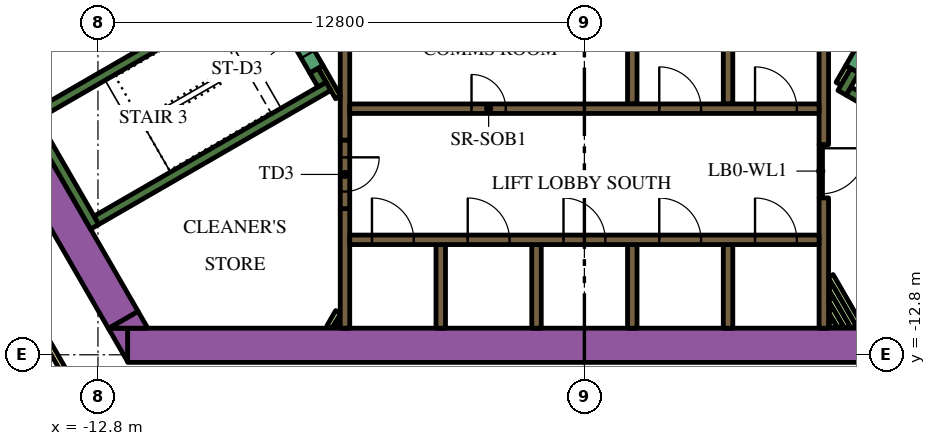
"""IFC4 building model, lengths in metres.
Left out: names, types, materials, properties, quantities, classifications, styles, units other than length and angle.
Written with IfcOpenShell. Run it as: python <this file> out.ifc"""

import sys

from ifc_helpers import new_model, si_unit, direction, frame, frame_2d, origin, place, context, subcontext, project, spatial, polyline, rectangle, outline, extrude, element, fill, save


model = new_model("IFC4")
c1 = context("Model", 3, precision=1e-05, world=origin(), true_north=direction((0.0, 1.0)))
c2 = subcontext(c1, "Body", "Model", "MODEL_VIEW")
j1 = project(units=[si_unit("LENGTHUNIT", "METRE"), si_unit("PLANEANGLEUNIT", "RADIAN")], contexts=[c1])
p1 = place(None, origin())
s1 = spatial("IfcSite", under=j1, at=p1, CompositionType="ELEMENT")
p2 = place(p1, origin())
s2 = spatial("IfcBuilding", under=s1, at=p2, CompositionType="ELEMENT")
p3 = place(p2, frame((0.0, 0.0, 51.0)))
s3 = spatial("IfcBuildingStorey", under=s2, at=p3, CompositionType="ELEMENT", Elevation=51.0)
p4 = place(p3, frame((-12.019, -12.55, 0.0), z_axis=(0.0, 0.0, 1.0), x_axis=(1.0, 0.0, 0.0)))
e1 = element("IfcWall", 1, at=p4, inside=s3, PredefinedType="SOLIDWALL", context=c2, shape_type="SweptSolid", body=[
    extrude(rectangle(XDim=22.083, YDim=0.9, at=frame_2d((11.042, 0.0))), origin(), (0.0, 0.0, 1.0), 3.9),
])
p5 = place(p3, origin())
e2 = element("IfcWall", 2, at=p5, inside=s3, PredefinedType="SOLIDWALL", context=c2, shape_type="SweptSolid", body=[
    extrude(outline(polyline([(-12.529, -12.1), (-12.021, -12.1), (-12.021, -12.98), (-12.529, -12.1)])), origin(), (0.0, 0.0, 1.0), 3.9),
])
p6 = place(p3, frame((-12.134, -11.883, 0.0), z_axis=(0.0, 0.0, 1.0), x_axis=(-0.500005339912, 0.866022320763, 0.0)))
e3 = element("IfcWall", 3, at=p6, inside=s3, PredefinedType="SOLIDWALL", context=c2, shape_type="SweptSolid", body=[
    extrude(rectangle(XDim=9.488, YDim=0.9, at=frame_2d((4.744, 0.0))), origin(), (0.0, 0.0, 1.0), 3.9),
])
e4 = element("IfcWall", 4, at=p5, inside=s3, PredefinedType="SOLIDWALL", context=c2, shape_type="SweptSolid", body=[
    extrude(outline(polyline([(-11.489, -12.1), (-12.505, -12.1), (-11.743, -11.66), (-11.489, -12.1)])), origin(), (0.0, 0.0, 1.0), 3.9),
])
p7 = place(p3, frame((12.84, -9.261, 0.0), z_axis=(0.0, 0.0, 1.0), x_axis=(-0.866013990052, 0.500019768644, 0.0)))
e5 = element("IfcWall", 5, at=p7, inside=s3, PredefinedType="SOLIDWALL", context=c2, shape_type="SweptSolid", body=[
    extrude(rectangle(XDim=6.8, YDim=0.25, at=frame_2d((3.4, 0.0))), origin(), (0.0, 0.0, 1.0), 3.9),
])
p8 = place(p3, frame((6.78, -5.906, 0.0), z_axis=(0.0, 0.0, 1.0), x_axis=(0.500223362819, 0.865896406789, 0.0)))
e6 = element("IfcWall", 6, at=p8, inside=s3, PredefinedType="SOLIDWALL", context=c2, shape_type="SweptSolid", body=[
    extrude(rectangle(XDim=0.675, YDim=0.25, at=frame_2d((0.337, 0.0))), origin(), (0.0, 0.0, 1.0), 3.9),
])
p9 = place(p3, frame((-12.885, -9.431, 0.0), z_axis=(0.0, 0.0, 1.0), x_axis=(-0.500020560727, 0.866013532718, 0.0)))
e7 = element("IfcWall", 7, at=p9, inside=s3, PredefinedType="SOLIDWALL", context=c2, shape_type="SweptSolid", body=[
    extrude(rectangle(XDim=3.45, YDim=0.25, at=frame_2d((1.725, 0.0))), origin(), (0.0, 0.0, 1.0), 3.9),
])
p10 = place(p3, frame((-14.44, -6.49, 0.0), z_axis=(0.0, 0.0, 1.0), x_axis=(0.866022966069, 0.500004222222, 0.0)))
e8 = element("IfcWall", 8, at=p10, inside=s3, PredefinedType="SOLIDWALL", context=c2, shape_type="SweptSolid", body=[
    extrude(rectangle(XDim=6.8, YDim=0.25, at=frame_2d((3.4, 0.0))), origin(), (0.0, 0.0, 1.0), 3.9),
])
p11 = place(p3, frame((-12.84, -9.261, 0.0), z_axis=(0.0, 0.0, 1.0), x_axis=(0.866016039709, 0.500016218704, 0.0)))
e9 = element("IfcWall", 9, at=p11, inside=s3, PredefinedType="SOLIDWALL", context=c2, shape_type="SweptSolid", body=[
    extrude(rectangle(XDim=7.05, YDim=0.25, at=frame_2d((3.525, 0.0))), origin(), (0.0, 0.0, 1.0), 3.9),
])
p12 = place(p3, frame((-6.905, -5.69, 0.0), z_axis=(0.0, 0.0, 1.0), x_axis=(-0.500402024738, 0.865793170242, 0.0)))
e10 = element("IfcWall", 10, at=p12, inside=s3, PredefinedType="SOLIDWALL", context=c2, shape_type="SweptSolid", body=[
    extrude(rectangle(XDim=0.425, YDim=0.25, at=frame_2d((0.212, 0.0))), origin(), (0.0, 0.0, 1.0), 3.9),
])
p13 = place(p3, frame((-3.78, -12.1, 0.0), z_axis=(0.0, 0.0, 1.0), x_axis=(0.0, 1.0, 0.0)))
e11 = element("IfcWall", 11, at=p13, inside=s3, PredefinedType="SOLIDWALL", context=c2, shape_type="SweptSolid", body=[
    extrude(rectangle(XDim=2.2, YDim=0.25, at=frame_2d((1.1, 0.0))), origin(), (0.0, 0.0, 1.0), 3.9),
])
p14 = place(p3, frame((-6.3, -12.1, 0.0), z_axis=(0.0, 0.0, 1.0), x_axis=(0.0, 1.0, 0.0)))
e12 = element("IfcWall", 12, at=p14, inside=s3, PredefinedType="SOLIDWALL", context=c2, shape_type="SweptSolid", body=[
    extrude(rectangle(XDim=3.146, YDim=0.25, at=frame_2d((1.573, 0.0))), origin(), (0.0, 0.0, 1.0), 3.9),
])
for number, where, z_axis, x_axis in (
    (13, (3.78, -4.0, 0.0), (0.0, 0.0, 1.0), (0.0, -1.0, 0.0)),
    (14, (1.26, -4.0, 0.0), (0.0, 0.0, 1.0), (0.0, -1.0, 0.0)),
):
    element("IfcWall", number, at=place(p3, frame(where, z_axis=z_axis, x_axis=x_axis)), inside=s3, PredefinedType="SOLIDWALL", context=c2, shape_type="SweptSolid", body=[
        extrude(rectangle(XDim=2.2, YDim=0.25, at=frame_2d((1.1, 0.0))), origin(), (0.0, 0.0, 1.0), 3.9),
    ])
p15 = place(p3, frame((-6.3, -3.75, 0.0), z_axis=(0.0, 0.0, 1.0), x_axis=(0.0, -1.0, 0.0)))
e15 = element("IfcWall", 15, at=p15, inside=s3, PredefinedType="SOLIDWALL", context=c2, shape_type="SweptSolid", body=[
    extrude(rectangle(XDim=3.404, YDim=0.25, at=frame_2d((1.702, 0.0))), origin(), (0.0, 0.0, 1.0), 3.9),
])
p16 = place(p3, frame((6.3, -7.27, 0.0), z_axis=(0.0, 0.0, 1.0), x_axis=(0.0, 1.0, 0.0)))
e16 = element("IfcWall", 16, at=p16, inside=s3, PredefinedType="SOLIDWALL", context=c2, shape_type="SweptSolid", body=[
    extrude(rectangle(XDim=3.586, YDim=0.25, at=frame_2d((1.793, 0.0))), origin(), (0.0, 0.0, 1.0), 3.9),
])
p17 = place(p3, frame((6.3, -12.1, 0.0), z_axis=(0.0, 0.0, 1.0), x_axis=(0.0, 1.0, 0.0)))
e17 = element("IfcWall", 17, at=p17, inside=s3, PredefinedType="SOLIDWALL", context=c2, shape_type="SweptSolid", body=[
    extrude(rectangle(XDim=3.428, YDim=0.25, at=frame_2d((1.714, 0.0))), origin(), (0.0, 0.0, 1.0), 3.9),
])
for number, where, z_axis, x_axis in (
    (18, (3.78, -12.1, 0.0), (0.0, 0.0, 1.0), (0.0, 1.0, 0.0)),
    (19, (1.26, -12.1, 0.0), (0.0, 0.0, 1.0), (0.0, 1.0, 0.0)),
    (20, (-1.26, -12.1, 0.0), (0.0, 0.0, 1.0), (0.0, 1.0, 0.0)),
):
    element("IfcWall", number, at=place(p3, frame(where, z_axis=z_axis, x_axis=x_axis)), inside=s3, PredefinedType="SOLIDWALL", context=c2, shape_type="SweptSolid", body=[
        extrude(rectangle(XDim=2.2, YDim=0.25, at=frame_2d((1.1, 0.0))), origin(), (0.0, 0.0, 1.0), 3.9),
    ])
p18 = place(p3, frame((-6.708, -12.068, 0.0), z_axis=(0.0, 0.0, 1.0), x_axis=(0.500000789788, 0.8660249478, 0.0)))
e21 = element("IfcWall", 21, at=p18, inside=s3, PredefinedType="PARTITIONING", context=c2, shape_type="SweptSolid", body=[
    extrude(rectangle(XDim=0.456, YDim=0.15, at=frame_2d((0.228, 0.0))), origin(), (0.0, 0.0, 1.0), 2.75),
])
p19 = place(p3, frame((-6.534, -12.068, 0.0), z_axis=(0.0, 0.0, 1.0), x_axis=(0.500240224089, 0.865886665912, 0.0)))
e22 = element("IfcWall", 22, at=p19, inside=s3, PredefinedType="PARTITIONING", context=c2, shape_type="SweptSolid", body=[
    extrude(rectangle(XDim=0.109, YDim=0.15, at=frame_2d((0.054, 0.0))), origin(), (0.0, 0.0, 1.0), 2.75),
])
p20 = place(p3, frame((-6.48, -6.027, 0.0), z_axis=(0.0, 0.0, 1.0), x_axis=(-0.499927229454, 0.866067413802, 0.0)))
e23 = element("IfcWall", 23, at=p20, inside=s3, PredefinedType="PARTITIONING", context=c2, shape_type="SweptSolid", body=[
    extrude(rectangle(XDim=0.929, YDim=0.15, at=frame_2d((0.464, 0.0))), origin(), (0.0, 0.0, 1.0), 3.9),
])
p21 = place(p3, frame((6.48, -10.726, 0.0), z_axis=(0.0, 0.0, 1.0), x_axis=(0.500017819788, -0.86601511528, 0.0)))
e24 = element("IfcWall", 24, at=p21, inside=s3, PredefinedType="PARTITIONING", context=c2, shape_type="SweptSolid", body=[
    extrude(rectangle(XDim=1.55, YDim=0.15, at=frame_2d((0.775, 0.0))), origin(), (0.0, 0.0, 1.0), 2.75),
])
p22 = place(p3, frame((6.48, -11.026, 0.0), z_axis=(0.0, 0.0, 1.0), x_axis=(0.49995654735, -0.86605048973, 0.0)))
e25 = element("IfcWall", 25, at=p22, inside=s3, PredefinedType="PARTITIONING", context=c2, shape_type="SweptSolid", body=[
    extrude(rectangle(XDim=1.204, YDim=0.15, at=frame_2d((0.602, 0.0))), origin(), (0.0, 0.0, 1.0), 2.75),
])
p23 = place(p3, frame((6.48, -11.326, 0.0), z_axis=(0.0, 0.0, 1.0), x_axis=(0.500059337743, -0.865991142412, 0.0)))
e26 = element("IfcWall", 26, at=p23, inside=s3, PredefinedType="PARTITIONING", context=c2, shape_type="SweptSolid", body=[
    extrude(rectangle(XDim=0.857, YDim=0.15, at=frame_2d((0.429, 0.0))), origin(), (0.0, 0.0, 1.0), 2.75),
])
p24 = place(p3, frame((6.48, -11.626, 0.0), z_axis=(0.0, 0.0, 1.0), x_axis=(0.500301480982, -0.865851273677, 0.0)))
e27 = element("IfcWall", 27, at=p24, inside=s3, PredefinedType="PARTITIONING", context=c2, shape_type="SweptSolid", body=[
    extrude(rectangle(XDim=0.511, YDim=0.15, at=frame_2d((0.255, 0.0))), origin(), (0.0, 0.0, 1.0), 2.75),
])
p25 = place(p3, frame((6.48, -11.926, 0.0), z_axis=(0.0, 0.0, 1.0), x_axis=(0.500450775723, -0.86576499183, 0.0)))
e28 = element("IfcWall", 28, at=p25, inside=s3, PredefinedType="PARTITIONING", context=c2, shape_type="SweptSolid", body=[
    extrude(rectangle(XDim=0.164, YDim=0.15, at=frame_2d((0.082, 0.0))), origin(), (0.0, 0.0, 1.0), 2.75),
])
p26 = place(p3, frame((6.945, -5.222, 0.0), z_axis=(0.0, 0.0, 1.0), x_axis=(-0.499818422106, -0.866130212453, 0.0)))
e29 = element("IfcWall", 29, at=p26, inside=s3, PredefinedType="PARTITIONING", context=c2, shape_type="SweptSolid", body=[
    extrude(rectangle(XDim=0.514, YDim=0.15, at=frame_2d((0.257, 0.0))), origin(), (0.0, 0.0, 1.0), 2.75),
])
p27 = place(p3, frame((-6.175, -9.775, 0.0), z_axis=(0.0, 0.0, 1.0), x_axis=(1.0, 0.0, 0.0)))
e30 = element("IfcWall", 30, at=p27, inside=s3, PredefinedType="SOLIDWALL", context=c2, shape_type="SweptSolid", body=[
    extrude(rectangle(XDim=12.35, YDim=0.25, at=frame_2d((6.175, 0.0))), origin(), (0.0, 0.0, 1.0), 3.9),
])
p28 = place(p27, frame((0.585, 0.0, 0.0)))
e31 = element("IfcOpeningElement", 31, at=p28, cuts=e30, PredefinedType="OPENING", context=c2, shape_type="SweptSolid", body=[
    extrude(rectangle(XDim=1.1, YDim=2.1, at=frame_2d((0.55, 1.05))), frame((0.0, 0.135, 0.0), z_axis=(0.0, -1.0, 0.0), x_axis=(1.0, 0.0, 0.0)), (0.0, 0.0, 1.0), 0.27),
])
p29 = place(p27, frame((3.105, 0.0, 0.0)))
e32 = element("IfcOpeningElement", 32, at=p29, cuts=e30, PredefinedType="OPENING", context=c2, shape_type="SweptSolid", body=[
    extrude(rectangle(XDim=1.1, YDim=2.1, at=frame_2d((0.55, 1.05))), frame((0.0, 0.135, 0.0), z_axis=(0.0, -1.0, 0.0), x_axis=(1.0, 0.0, 0.0)), (0.0, 0.0, 1.0), 0.27),
])
p30 = place(p27, frame((5.625, 0.0, 0.0)))
e33 = element("IfcOpeningElement", 33, at=p30, cuts=e30, PredefinedType="OPENING", context=c2, shape_type="SweptSolid", body=[
    extrude(rectangle(XDim=1.1, YDim=2.1, at=frame_2d((0.55, 1.05))), frame((0.0, 0.135, 0.0), z_axis=(0.0, -1.0, 0.0), x_axis=(1.0, 0.0, 0.0)), (0.0, 0.0, 1.0), 0.27),
])
p31 = place(p27, frame((8.145, 0.0, 0.0)))
e34 = element("IfcOpeningElement", 34, at=p31, cuts=e30, PredefinedType="OPENING", context=c2, shape_type="SweptSolid", body=[
    extrude(rectangle(XDim=1.1, YDim=2.1, at=frame_2d((0.55, 1.05))), frame((0.0, 0.135, 0.0), z_axis=(0.0, -1.0, 0.0), x_axis=(1.0, 0.0, 0.0)), (0.0, 0.0, 1.0), 0.27),
])
p32 = place(p27, frame((10.665, 0.0, 0.0)))
e35 = element("IfcOpeningElement", 35, at=p32, cuts=e30, PredefinedType="OPENING", context=c2, shape_type="SweptSolid", body=[
    extrude(rectangle(XDim=1.1, YDim=2.1, at=frame_2d((0.55, 1.05))), frame((0.0, 0.135, 0.0), z_axis=(0.0, -1.0, 0.0), x_axis=(1.0, 0.0, 0.0)), (0.0, 0.0, 1.0), 0.27),
])
p33 = place(p3, frame((-6.175, -6.325, 0.0), z_axis=(0.0, 0.0, 1.0), x_axis=(1.0, 0.0, 0.0)))
e36 = element("IfcWall", 36, at=p33, inside=s3, PredefinedType="SOLIDWALL", context=c2, shape_type="SweptSolid", body=[
    extrude(rectangle(XDim=12.35, YDim=0.25, at=frame_2d((6.175, 0.0))), origin(), (0.0, 0.0, 1.0), 3.9),
])
p34 = place(p33, frame((3.205, 0.0, 0.0)))
e37 = element("IfcOpeningElement", 37, at=p34, cuts=e36, PredefinedType="OPENING", context=c2, shape_type="SweptSolid", body=[
    extrude(rectangle(XDim=0.9, YDim=2.1, at=frame_2d((0.45, 1.05))), frame((0.0, 0.135, 0.0), z_axis=(0.0, -1.0, 0.0), x_axis=(1.0, 0.0, 0.0)), (0.0, 0.0, 1.0), 0.27),
])
p35 = place(p33, frame((8.145, 0.0, 0.0)))
e38 = element("IfcOpeningElement", 38, at=p35, cuts=e36, PredefinedType="OPENING", context=c2, shape_type="SweptSolid", body=[
    extrude(rectangle(XDim=1.1, YDim=2.1, at=frame_2d((0.55, 1.05))), frame((0.0, 0.135, 0.0), z_axis=(0.0, -1.0, 0.0), x_axis=(1.0, 0.0, 0.0)), (0.0, 0.0, 1.0), 0.27),
])
p36 = place(p33, frame((10.665, 0.0, 0.0)))
e39 = element("IfcOpeningElement", 39, at=p36, cuts=e36, PredefinedType="OPENING", context=c2, shape_type="SweptSolid", body=[
    extrude(rectangle(XDim=1.1, YDim=2.1, at=frame_2d((0.55, 1.05))), frame((0.0, 0.135, 0.0), z_axis=(0.0, -1.0, 0.0), x_axis=(1.0, 0.0, 0.0)), (0.0, 0.0, 1.0), 0.27),
])
p37 = place(p3, frame((7.053, -5.284, 0.0), z_axis=(0.0, 0.0, 1.0), x_axis=(0.500078061341, 0.865980330357, 0.0)))
e40 = element("IfcWall", 40, at=p37, inside=s3, PredefinedType="SOLIDWALL", context=c2, shape_type="SweptSolid", body=[
    extrude(rectangle(XDim=2.1, YDim=0.4, at=frame_2d((1.05, 0.0))), origin(), (0.0, 0.0, 1.0), 3.9),
])
p38 = place(p37, frame((0.45, 0.0, 0.0)))
e41 = element("IfcOpeningElement", 41, at=p38, cuts=e40, PredefinedType="OPENING", context=c2, shape_type="SweptSolid", body=[
    extrude(rectangle(XDim=1.2, YDim=2.1, at=frame_2d((0.6, 1.05))), frame((0.0, 0.21, 0.0), z_axis=(0.0, -1.0, 0.0), x_axis=(1.0, 0.0, 0.0)), (0.0, 0.0, 1.0), 0.42),
])
p39 = place(p3, frame((-8.103, -3.466, 0.0), z_axis=(0.0, 0.0, 1.0), x_axis=(0.500078061341, -0.865980330357, 0.0)))
e42 = element("IfcWall", 42, at=p39, inside=s3, PredefinedType="SOLIDWALL", context=c2, shape_type="SweptSolid", body=[
    extrude(rectangle(XDim=2.1, YDim=0.4, at=frame_2d((1.05, 0.0))), origin(), (0.0, 0.0, 1.0), 3.9),
])
p40 = place(p39, frame((0.45, 0.0, 0.0)))
e43 = element("IfcOpeningElement", 43, at=p40, cuts=e42, PredefinedType="OPENING", context=c2, shape_type="SweptSolid", body=[
    extrude(rectangle(XDim=1.2, YDim=2.1, at=frame_2d((0.6, 1.05))), frame((0.0, 0.21, 0.0), z_axis=(0.0, -1.0, 0.0), x_axis=(1.0, 0.0, 0.0)), (0.0, 0.0, 1.0), 0.42),
])
p41 = place(p3, frame((-6.3, -7.154, 0.0), z_axis=(0.0, 0.0, 1.0), x_axis=(0.0, -1.0, 0.0)))
e44 = element("IfcWall", 44, at=p41, inside=s3, PredefinedType="SOLIDWALL", context=c2, shape_type="SweptSolid", body=[
    extrude(rectangle(XDim=1.8, YDim=0.25, at=frame_2d((0.9, 0.0))), origin(), (0.0, 0.0, 1.0), 3.9),
])
p42 = place(p41, frame((0.45, 0.0, 0.0)))
e45 = element("IfcOpeningElement", 45, at=p42, cuts=e44, PredefinedType="OPENING", context=c2, shape_type="SweptSolid", body=[
    extrude(rectangle(XDim=0.9, YDim=2.1, at=frame_2d((0.45, 1.05))), frame((0.0, 0.135, 0.0), z_axis=(0.0, -1.0, 0.0), x_axis=(1.0, 0.0, 0.0)), (0.0, 0.0, 1.0), 0.27),
])
p43 = place(p3, frame((6.22, -7.266, 0.0), z_axis=(0.0, 0.0, 1.0), x_axis=(0.0, -1.0, 0.0)))
e46 = element("IfcWall", 46, at=p43, inside=s3, PredefinedType="PARTITIONING", context=c2, shape_type="SweptSolid", body=[
    extrude(rectangle(XDim=1.4, YDim=0.09, at=frame_2d((0.7, 0.0))), origin(), (0.0, 0.0, 1.0), 2.75),
])
p44 = place(p43, frame((0.1, 0.0, 0.0)))
e47 = element("IfcOpeningElement", 47, at=p44, cuts=e46, PredefinedType="OPENING", context=c2, shape_type="SweptSolid", body=[
    extrude(rectangle(XDim=1.2, YDim=2.1, at=frame_2d((0.6, 1.05))), frame((0.0, 0.055, 0.0), z_axis=(0.0, -1.0, 0.0), x_axis=(1.0, 0.0, 0.0)), (0.0, 0.0, 1.0), 0.11),
])
p45 = place(p3, frame((-12.918, -14.575, 0.0), z_axis=(0.0, 0.0, 1.0), x_axis=(-0.500009150678, 0.866020120573, 0.0)))
e48 = element("IfcWall", 48, at=p45, inside=s3, PredefinedType="PARTITIONING", context=c2, shape_type="SweptSolid", body=[
    extrude(rectangle(XDim=5.258, YDim=0.15, at=frame_2d((2.629, 0.0))), origin(), (0.0, 0.0, 1.0), 2.75),
])
p46 = place(p28, origin())
e49 = element("IfcDoor", 49, at=p46, inside=s3, OperationType="DOUBLE_DOOR_SLIDING", PredefinedType="DOOR", context=c2, shape_type="SweptSolid", body=[
    extrude(rectangle(XDim=1.1, YDim=2.1, at=frame_2d((0.55, 1.05))), frame((0.0, 0.025, 0.0), z_axis=(0.0, -1.0, 0.0), x_axis=(1.0, 0.0, 0.0)), (0.0, 0.0, 1.0), 0.05),
])
fill(e31, e49)
p47 = place(p29, origin())
e50 = element("IfcDoor", 50, at=p47, inside=s3, OperationType="DOUBLE_DOOR_SLIDING", PredefinedType="DOOR", context=c2, shape_type="SweptSolid", body=[
    extrude(rectangle(XDim=1.1, YDim=2.1, at=frame_2d((0.55, 1.05))), frame((0.0, 0.025, 0.0), z_axis=(0.0, -1.0, 0.0), x_axis=(1.0, 0.0, 0.0)), (0.0, 0.0, 1.0), 0.05),
])
fill(e32, e50)
p48 = place(p30, origin())
e51 = element("IfcDoor", 51, at=p48, inside=s3, OperationType="DOUBLE_DOOR_SLIDING", PredefinedType="DOOR", context=c2, shape_type="SweptSolid", body=[
    extrude(rectangle(XDim=1.1, YDim=2.1, at=frame_2d((0.55, 1.05))), frame((0.0, 0.025, 0.0), z_axis=(0.0, -1.0, 0.0), x_axis=(1.0, 0.0, 0.0)), (0.0, 0.0, 1.0), 0.05),
])
fill(e33, e51)
p49 = place(p31, origin())
e52 = element("IfcDoor", 52, at=p49, inside=s3, OperationType="DOUBLE_DOOR_SLIDING", PredefinedType="DOOR", context=c2, shape_type="SweptSolid", body=[
    extrude(rectangle(XDim=1.1, YDim=2.1, at=frame_2d((0.55, 1.05))), frame((0.0, 0.025, 0.0), z_axis=(0.0, -1.0, 0.0), x_axis=(1.0, 0.0, 0.0)), (0.0, 0.0, 1.0), 0.05),
])
fill(e34, e52)
p50 = place(p32, origin())
e53 = element("IfcDoor", 53, at=p50, inside=s3, OperationType="DOUBLE_DOOR_SLIDING", PredefinedType="DOOR", context=c2, shape_type="SweptSolid", body=[
    extrude(rectangle(XDim=1.1, YDim=2.1, at=frame_2d((0.55, 1.05))), frame((0.0, 0.025, 0.0), z_axis=(0.0, -1.0, 0.0), x_axis=(1.0, 0.0, 0.0)), (0.0, 0.0, 1.0), 0.05),
])
fill(e35, e53)
p51 = place(p34, origin())
e54 = element("IfcDoor", 54, at=p51, inside=s3, OperationType="SINGLE_SWING_LEFT", PredefinedType="DOOR", context=c2, shape_type="SweptSolid", body=[
    extrude(rectangle(XDim=0.9, YDim=2.1, at=frame_2d((0.45, 1.05))), frame((0.0, 0.025, 0.0), z_axis=(0.0, -1.0, 0.0), x_axis=(1.0, 0.0, 0.0)), (0.0, 0.0, 1.0), 0.05),
])
fill(e37, e54)
p52 = place(p35, origin())
e55 = element("IfcDoor", 55, at=p52, inside=s3, OperationType="DOUBLE_DOOR_SLIDING", PredefinedType="DOOR", context=c2, shape_type="SweptSolid", body=[
    extrude(rectangle(XDim=1.1, YDim=2.1, at=frame_2d((0.55, 1.05))), frame((0.0, 0.025, 0.0), z_axis=(0.0, -1.0, 0.0), x_axis=(1.0, 0.0, 0.0)), (0.0, 0.0, 1.0), 0.05),
])
fill(e38, e55)
p53 = place(p36, origin())
e56 = element("IfcDoor", 56, at=p53, inside=s3, OperationType="DOUBLE_DOOR_SLIDING", PredefinedType="DOOR", context=c2, shape_type="SweptSolid", body=[
    extrude(rectangle(XDim=1.1, YDim=2.1, at=frame_2d((0.55, 1.05))), frame((0.0, 0.025, 0.0), z_axis=(0.0, -1.0, 0.0), x_axis=(1.0, 0.0, 0.0)), (0.0, 0.0, 1.0), 0.05),
])
fill(e39, e56)
p54 = place(p40, origin())
e57 = element("IfcDoor", 57, at=p54, inside=s3, OperationType="SINGLE_SWING_LEFT", PredefinedType="DOOR", context=c2, shape_type="SweptSolid", body=[
    extrude(rectangle(XDim=1.2, YDim=2.1, at=frame_2d((0.6, 1.05))), frame((0.0, 0.025, 0.0), z_axis=(0.0, -1.0, 0.0), x_axis=(1.0, 0.0, 0.0)), (0.0, 0.0, 1.0), 0.05),
])
fill(e43, e57)
p55 = place(p42, origin())
e58 = element("IfcDoor", 58, at=p55, inside=s3, OperationType="SINGLE_SWING_LEFT", PredefinedType="DOOR", context=c2, shape_type="SweptSolid", body=[
    extrude(rectangle(XDim=0.9, YDim=2.1, at=frame_2d((0.45, 1.05))), frame((0.0, 0.025, 0.0), z_axis=(0.0, -1.0, 0.0), x_axis=(1.0, 0.0, 0.0)), (0.0, 0.0, 1.0), 0.05),
])
fill(e45, e58)
p56 = place(p44, origin())
e59 = element("IfcDoor", 59, at=p56, inside=s3, OperationType="SINGLE_SWING_LEFT", PredefinedType="DOOR", context=c2, shape_type="SweptSolid", body=[
    extrude(rectangle(XDim=1.2, YDim=2.1, at=frame_2d((0.6, 1.05))), frame((0.0, 0.025, 0.0), z_axis=(0.0, -1.0, 0.0), x_axis=(1.0, 0.0, 0.0)), (0.0, 0.0, 1.0), 0.05),
])
fill(e47, e59)
save(model, sys.argv[1])
